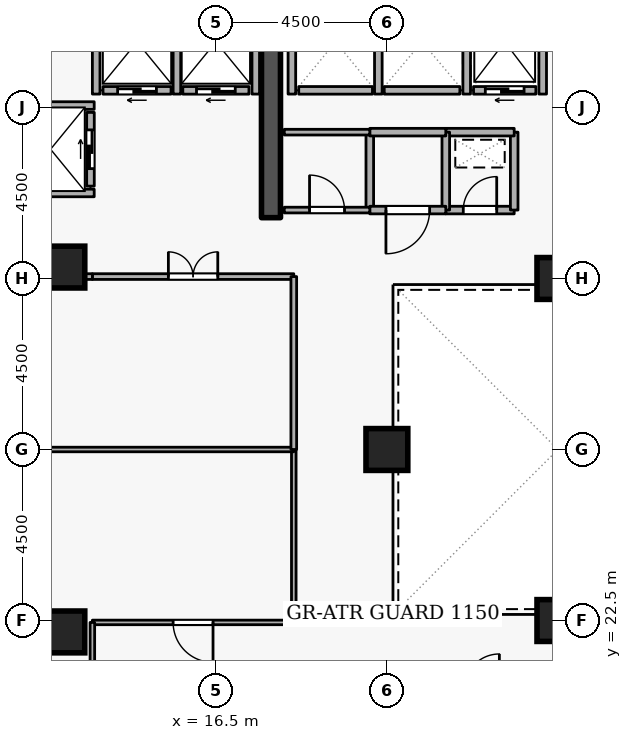
"""IFC4 building model, lengths in metres.
Left out: names, types, materials, properties, quantities, classifications, styles, units other than length and angle.
Written with IfcOpenShell. Run it as: python <this file> out.ifc"""

import sys

from ifc_helpers import new_model, si_unit, direction, frame, frame_2d, origin, origin_2d, place, context, subcontext, project, spatial, rectangle, extrude, element, fill, save


model = new_model("IFC4")
c1 = context("Model", 3, precision=1e-05, world=origin(), true_north=direction((0.0, 1.0)))
c2 = subcontext(c1, "Body", "Model", "MODEL_VIEW")
j1 = project(units=[si_unit("LENGTHUNIT", "METRE"), si_unit("PLANEANGLEUNIT", "RADIAN")], contexts=[c1])
p1 = place(None, origin())
s1 = spatial("IfcSite", under=j1, at=p1, CompositionType="ELEMENT")
p2 = place(p1, origin())
s2 = spatial("IfcBuilding", under=s1, at=p2, CompositionType="ELEMENT")
p3 = place(p2, frame((0.0, 0.0, 156.3)))
s3 = spatial("IfcBuildingStorey", under=s2, at=p3, CompositionType="ELEMENT", Elevation=156.3)
p4 = place(p3, frame((17.95, 33.1, 0.0), z_axis=(0.0, 0.0, 1.0), x_axis=(0.0, 1.0, 0.0)))
e1 = element("IfcWall", 1, at=p4, inside=s3, PredefinedType="SHEAR", context=c2, shape_type="SweptSolid", body=[
    extrude(rectangle(XDim=5.8, YDim=0.5, at=frame_2d((2.9, 0.0))), origin(), (0.0, 0.0, 1.0), 3.6),
])
for number, where, z_axis, x_axis in (
    (2, (12.5, 22.2, 0.0), (0.0, 0.0, 1.0), (1.0, 0.0, 0.0)),
    (3, (12.5, 31.8, 0.0), (0.0, 0.0, 1.0), (1.0, 0.0, 0.0)),
    (4, (25.5, 22.5, 0.0), (0.0, 0.0, 1.0), (1.0, 0.0, 0.0)),
    (5, (25.5, 31.5, 0.0), (0.0, 0.0, 1.0), (1.0, 0.0, 0.0)),
    (6, (21.0, 27.0, 0.0), (0.0, 0.0, 1.0), (1.0, 0.0, 0.0)),
):
    element("IfcColumn", number, at=place(p3, frame(where, z_axis=z_axis, x_axis=x_axis)), inside=s3, PredefinedType="COLUMN", context=c2, shape_type="SweptSolid", body=[
        extrude(rectangle(XDim=1.1, YDim=1.1, at=origin_2d()), origin(), (0.0, 0.0, 1.0), 3.6),
    ])
p5 = place(p3, frame((24.92, 36.45, 0.0), z_axis=(0.0, 0.0, 1.0), x_axis=(-1.0, 0.0, 0.0)))
e7 = element("IfcWall", 7, at=p5, inside=s3, PredefinedType="STANDARD", context=c2, shape_type="SweptSolid", body=[
    extrude(rectangle(XDim=1.64, YDim=0.2, at=frame_2d((0.82, 0.0))), origin(), (0.0, 0.0, 1.0), 3.34),
])
p6 = place(p5, frame((0.31, 0.0, 0.0)))
e8 = element("IfcOpeningElement", 8, at=p6, cuts=e7, PredefinedType="OPENING", context=c2, shape_type="SweptSolid", body=[
    extrude(rectangle(XDim=1.02, YDim=2.06, at=frame_2d((0.51, 1.03))), frame((0.0, 0.11, 0.0), z_axis=(0.0, -1.0, 0.0), x_axis=(1.0, 0.0, 0.0)), (0.0, 0.0, 1.0), 0.22),
])
p7 = place(p3, frame((22.92, 36.45, 0.0), z_axis=(0.0, 0.0, 1.0), x_axis=(-1.0, 0.0, 0.0)))
e9 = element("IfcWall", 9, at=p7, inside=s3, PredefinedType="STANDARD", context=c2, shape_type="SweptSolid", body=[
    extrude(rectangle(XDim=1.99, YDim=0.2, at=frame_2d((0.995, 0.0))), origin(), (0.0, 0.0, 1.0), 3.34),
])
p8 = place(p3, frame((20.62, 36.45, 0.0), z_axis=(0.0, 0.0, 1.0), x_axis=(-1.0, 0.0, 0.0)))
e10 = element("IfcWall", 10, at=p8, inside=s3, PredefinedType="STANDARD", context=c2, shape_type="SweptSolid", body=[
    extrude(rectangle(XDim=1.94, YDim=0.2, at=frame_2d((0.97, 0.0))), origin(), (0.0, 0.0, 1.0), 3.34),
])
p9 = place(p3, frame((17.37, 36.45, 0.0), z_axis=(0.0, 0.0, 1.0), x_axis=(-1.0, 0.0, 0.0)))
e11 = element("IfcWall", 11, at=p9, inside=s3, PredefinedType="STANDARD", context=c2, shape_type="SweptSolid", body=[
    extrude(rectangle(XDim=1.74, YDim=0.2, at=frame_2d((0.87, 0.0))), origin(), (0.0, 0.0, 1.0), 3.34),
])
p10 = place(p9, frame((0.36, 0.0, 0.0)))
e12 = element("IfcOpeningElement", 12, at=p10, cuts=e11, PredefinedType="OPENING", context=c2, shape_type="SweptSolid", body=[
    extrude(rectangle(XDim=1.02, YDim=2.06, at=frame_2d((0.51, 1.03))), frame((0.0, 0.11, 0.0), z_axis=(0.0, -1.0, 0.0), x_axis=(1.0, 0.0, 0.0)), (0.0, 0.0, 1.0), 0.22),
])
p11 = place(p3, frame((15.32, 36.45, 0.0), z_axis=(0.0, 0.0, 1.0), x_axis=(-1.0, 0.0, 0.0)))
e13 = element("IfcWall", 13, at=p11, inside=s3, PredefinedType="STANDARD", context=c2, shape_type="SweptSolid", body=[
    extrude(rectangle(XDim=1.79, YDim=0.2, at=frame_2d((0.895, 0.0))), origin(), (0.0, 0.0, 1.0), 3.34),
])
p12 = place(p11, frame((0.385, 0.0, 0.0)))
e14 = element("IfcOpeningElement", 14, at=p12, cuts=e13, PredefinedType="OPENING", context=c2, shape_type="SweptSolid", body=[
    extrude(rectangle(XDim=1.02, YDim=2.06, at=frame_2d((0.51, 1.03))), frame((0.0, 0.11, 0.0), z_axis=(0.0, -1.0, 0.0), x_axis=(1.0, 0.0, 0.0)), (0.0, 0.0, 1.0), 0.22),
])
p13 = place(p3, frame((13.2, 33.93, 0.0), z_axis=(0.0, 0.0, 1.0), x_axis=(0.0, 1.0, 0.0)))
e15 = element("IfcWall", 15, at=p13, inside=s3, PredefinedType="STANDARD", context=c2, shape_type="SweptSolid", body=[
    extrude(rectangle(XDim=1.94, YDim=0.2, at=frame_2d((0.97, 0.0))), origin(), (0.0, 0.0, 1.0), 3.34),
])
p14 = place(p13, frame((0.46, 0.0, 0.0)))
e16 = element("IfcOpeningElement", 16, at=p14, cuts=e15, PredefinedType="OPENING", context=c2, shape_type="SweptSolid", body=[
    extrude(rectangle(XDim=1.02, YDim=2.06, at=frame_2d((0.51, 1.03))), frame((0.0, 0.11, 0.0), z_axis=(0.0, -1.0, 0.0), x_axis=(1.0, 0.0, 0.0)), (0.0, 0.0, 1.0), 0.22),
])
for number, where, z_axis, x_axis in (
    (17, (25.1, 36.352, 0.0), (0.0, 0.0, 1.0), (0.0, 1.0, 0.0)),
    (18, (23.1, 36.352, 0.0), (0.0, 0.0, 1.0), (0.0, 1.0, 0.0)),
    (19, (20.775, 36.352, 0.0), (0.0, 0.0, 1.0), (0.0, 1.0, 0.0)),
    (20, (18.5, 36.352, 0.0), (0.0, 0.0, 1.0), (0.0, 1.0, 0.0)),
):
    element("IfcWall", number, at=place(p3, frame(where, z_axis=z_axis, x_axis=x_axis)), inside=s3, PredefinedType="STANDARD", context=c2, shape_type="SweptSolid", body=[
        extrude(rectangle(XDim=2.536, YDim=0.2, at=frame_2d((1.268, 0.0))), origin(), (0.0, 0.0, 1.0), 3.34),
    ])
p15 = place(p3, frame((17.55, 36.352, 0.0), z_axis=(0.0, 0.0, 1.0), x_axis=(0.0, 1.0, 0.0)))
e21 = element("IfcWall", 21, at=p15, inside=s3, PredefinedType="STANDARD", context=c2, shape_type="SweptSolid", body=[
    extrude(rectangle(XDim=2.636, YDim=0.2, at=frame_2d((1.318, 0.0))), origin(), (0.0, 0.0, 1.0), 2.545),
])
for number, where, z_axis, x_axis in (
    (22, (15.475, 36.352, 0.0), (0.0, 0.0, 1.0), (0.0, 1.0, 0.0)),
    (23, (13.35, 36.352, 0.0), (0.0, 0.0, 1.0), (0.0, 1.0, 0.0)),
):
    element("IfcWall", number, at=place(p3, frame(where, z_axis=z_axis, x_axis=x_axis)), inside=s3, PredefinedType="STANDARD", context=c2, shape_type="SweptSolid", body=[
        extrude(rectangle(XDim=2.636, YDim=0.2, at=frame_2d((1.318, 0.0))), origin(), (0.0, 0.0, 1.0), 3.34),
    ])
for number, where, z_axis, x_axis in (
    (24, (11.002, 36.05, 0.0), (0.0, 0.0, 1.0), (1.0, 0.0, 0.0)),
    (25, (11.002, 33.75, 0.0), (0.0, 0.0, 1.0), (1.0, 0.0, 0.0)),
):
    element("IfcWall", number, at=place(p3, frame(where, z_axis=z_axis, x_axis=x_axis)), inside=s3, PredefinedType="STANDARD", context=c2, shape_type="SweptSolid", body=[
        extrude(rectangle(XDim=2.296, YDim=0.2, at=frame_2d((1.148, 0.0))), origin(), (0.0, 0.0, 1.0), 3.34),
    ])
p16 = place(p3, frame((22.55, 33.3, 0.0), z_axis=(0.0, 0.0, 1.0), x_axis=(1.0, 0.0, 0.0)))
e26 = element("IfcWall", 26, at=p16, inside=s3, PredefinedType="STANDARD", context=c2, shape_type="SweptSolid", body=[
    extrude(rectangle(XDim=1.8, YDim=0.2, at=frame_2d((0.9, 0.0))), origin(), (0.0, 0.0, 1.0), 3.34),
])
p17 = place(p16, frame((0.46, 0.0, 0.0)))
e27 = element("IfcOpeningElement", 27, at=p17, cuts=e26, PredefinedType="OPENING", context=c2, shape_type="SweptSolid", body=[
    extrude(rectangle(XDim=0.88, YDim=2.04, at=frame_2d((0.44, 1.02))), frame((0.0, 0.11, 0.0), z_axis=(0.0, -1.0, 0.0), x_axis=(1.0, 0.0, 0.0)), (0.0, 0.0, 1.0), 0.22),
])
p18 = place(p3, frame((24.35, 33.3, 0.0), z_axis=(0.0, 0.0, 1.0), x_axis=(0.0, 1.0, 0.0)))
e28 = element("IfcWall", 28, at=p18, inside=s3, PredefinedType="STANDARD", context=c2, shape_type="SweptSolid", body=[
    extrude(rectangle(XDim=2.05, YDim=0.2, at=frame_2d((1.025, 0.0))), origin(), (0.0, 0.0, 1.0), 3.34),
])
p19 = place(p3, frame((24.35, 35.35, 0.0), z_axis=(0.0, 0.0, 1.0), x_axis=(-1.0, 0.0, 0.0)))
e29 = element("IfcWall", 29, at=p19, inside=s3, PredefinedType="STANDARD", context=c2, shape_type="SweptSolid", body=[
    extrude(rectangle(XDim=1.8, YDim=0.2, at=frame_2d((0.9, 0.0))), origin(), (0.0, 0.0, 1.0), 3.34),
])
for number, where, z_axis, x_axis in (
    (30, (22.55, 35.35, 0.0), (0.0, 0.0, 1.0), (0.0, -1.0, 0.0)),
    (31, (20.55, 33.3, 0.0), (0.0, 0.0, 1.0), (0.0, 1.0, 0.0)),
):
    element("IfcWall", number, at=place(p3, frame(where, z_axis=z_axis, x_axis=x_axis)), inside=s3, PredefinedType="STANDARD", context=c2, shape_type="SweptSolid", body=[
        extrude(rectangle(XDim=2.05, YDim=0.2, at=frame_2d((1.025, 0.0))), origin(), (0.0, 0.0, 1.0), 3.34),
    ])
p20 = place(p3, frame((20.55, 35.35, 0.0), z_axis=(0.0, 0.0, 1.0), x_axis=(1.0, 0.0, 0.0)))
e32 = element("IfcWall", 32, at=p20, inside=s3, PredefinedType="STANDARD", context=c2, shape_type="SweptSolid", body=[
    extrude(rectangle(XDim=2.0, YDim=0.2, at=frame_2d((1.0, 0.0))), origin(), (0.0, 0.0, 1.0), 3.34),
])
p21 = place(p3, frame((22.55, 33.3, 0.0), z_axis=(0.0, 0.0, 1.0), x_axis=(-1.0, 0.0, 0.0)))
e33 = element("IfcWall", 33, at=p21, inside=s3, PredefinedType="STANDARD", context=c2, shape_type="SweptSolid", body=[
    extrude(rectangle(XDim=2.0, YDim=0.2, at=frame_2d((1.0, 0.0))), origin(), (0.0, 0.0, 1.0), 3.34),
])
p22 = place(p21, frame((0.425, 0.0, 0.0)))
e34 = element("IfcOpeningElement", 34, at=p22, cuts=e33, PredefinedType="OPENING", context=c2, shape_type="SweptSolid", body=[
    extrude(rectangle(XDim=1.15, YDim=2.1, at=frame_2d((0.575, 1.05))), frame((0.0, 0.11, 0.0), z_axis=(0.0, -1.0, 0.0), x_axis=(1.0, 0.0, 0.0)), (0.0, 0.0, 1.0), 0.22),
])
p23 = place(p3, frame((18.3, 33.3, 0.0), z_axis=(0.0, 0.0, 1.0), x_axis=(1.0, 0.0, 0.0)))
e35 = element("IfcWall", 35, at=p23, inside=s3, PredefinedType="PARTITIONING", context=c2, shape_type="SweptSolid", body=[
    extrude(rectangle(XDim=2.25, YDim=0.15, at=frame_2d((1.125, 0.0))), origin(), (0.0, 0.0, 1.0), 3.34),
])
p24 = place(p23, frame((0.665, 0.0, 0.0)))
e36 = element("IfcOpeningElement", 36, at=p24, cuts=e35, PredefinedType="OPENING", context=c2, shape_type="SweptSolid", body=[
    extrude(rectangle(XDim=0.92, YDim=2.08, at=frame_2d((0.46, 1.04))), frame((0.0, 0.085, 0.0), z_axis=(0.0, -1.0, 0.0), x_axis=(1.0, 0.0, 0.0)), (0.0, 0.0, 1.0), 0.17),
])
p25 = place(p3, frame((20.55, 35.35, 0.0), z_axis=(0.0, 0.0, 1.0), x_axis=(-1.0, 0.0, 0.0)))
e37 = element("IfcWall", 37, at=p25, inside=s3, PredefinedType="PARTITIONING", context=c2, shape_type="SweptSolid", body=[
    extrude(rectangle(XDim=2.25, YDim=0.15, at=frame_2d((1.125, 0.0))), origin(), (0.0, 0.0, 1.0), 3.34),
])
p26 = place(p3, frame((18.55, 27.0, 0.0), z_axis=(0.0, 0.0, 1.0), x_axis=(0.0, -1.0, 0.0)))
e38 = element("IfcWall", 38, at=p26, inside=s3, PredefinedType="PARTITIONING", context=c2, shape_type="SweptSolid", body=[
    extrude(rectangle(XDim=4.55, YDim=0.12, at=frame_2d((2.275, 0.0))), origin(), (0.0, 0.0, 1.0), 3.34),
])
p27 = place(p3, frame((18.55, 22.45, 0.0), z_axis=(0.0, 0.0, 1.0), x_axis=(-1.0, 0.0, 0.0)))
e39 = element("IfcWall", 39, at=p27, inside=s3, PredefinedType="PARTITIONING", context=c2, shape_type="SweptSolid", body=[
    extrude(rectangle(XDim=5.3, YDim=0.12, at=frame_2d((2.65, 0.0))), origin(), (0.0, 0.0, 1.0), 3.34),
])
p28 = place(p27, frame((2.125, 0.0, 0.0)))
e40 = element("IfcOpeningElement", 40, at=p28, cuts=e39, PredefinedType="OPENING", context=c2, shape_type="SweptSolid", body=[
    extrude(rectangle(XDim=1.05, YDim=2.1, at=frame_2d((0.525, 1.05))), frame((0.0, 0.07, 0.0), z_axis=(0.0, -1.0, 0.0), x_axis=(1.0, 0.0, 0.0)), (0.0, 0.0, 1.0), 0.14),
])
p29 = place(p3, frame((13.25, 22.45, 0.0), z_axis=(0.0, 0.0, 1.0), x_axis=(0.0, -1.0, 0.0)))
e41 = element("IfcWall", 41, at=p29, inside=s3, PredefinedType="PARTITIONING", context=c2, shape_type="SweptSolid", body=[
    extrude(rectangle(XDim=1.75, YDim=0.12, at=frame_2d((0.875, 0.0))), origin(), (0.0, 0.0, 1.0), 3.34),
])
p30 = place(p3, frame((7.78, 27.0, 0.0), z_axis=(0.0, 0.0, 1.0), x_axis=(1.0, 0.0, 0.0)))
e42 = element("IfcWall", 42, at=p30, inside=s3, PredefinedType="PARTITIONING", context=c2, shape_type="SweptSolid", body=[
    extrude(rectangle(XDim=10.77, YDim=0.12, at=frame_2d((5.385, 0.0))), origin(), (0.0, 0.0, 1.0), 2.932),
])
p31 = place(p3, frame((13.25, 31.55, 0.0), z_axis=(0.0, 0.0, 1.0), x_axis=(1.0, 0.0, 0.0)))
e43 = element("IfcWall", 43, at=p31, inside=s3, PredefinedType="PARTITIONING", context=c2, shape_type="SweptSolid", body=[
    extrude(rectangle(XDim=5.3, YDim=0.15, at=frame_2d((2.65, 0.0))), origin(), (0.0, 0.0, 1.0), 3.34),
])
p32 = place(p31, frame((2.0, 0.0, 0.0)))
e44 = element("IfcOpeningElement", 44, at=p32, cuts=e43, PredefinedType="OPENING", context=c2, shape_type="SweptSolid", body=[
    extrude(rectangle(XDim=1.3, YDim=2.12, at=frame_2d((0.65, 1.06))), frame((0.0, 0.085, 0.0), z_axis=(0.0, -1.0, 0.0), x_axis=(1.0, 0.0, 0.0)), (0.0, 0.0, 1.0), 0.17),
])
p33 = place(p3, frame((18.55, 31.55, 0.0), z_axis=(0.0, 0.0, 1.0), x_axis=(0.0, -1.0, 0.0)))
e45 = element("IfcWall", 45, at=p33, inside=s3, PredefinedType="PARTITIONING", context=c2, shape_type="SweptSolid", body=[
    extrude(rectangle(XDim=4.55, YDim=0.15, at=frame_2d((2.275, 0.0))), origin(), (0.0, 0.0, 1.0), 3.34),
])
p34 = place(p3, frame((10.9, 31.55, 0.0), z_axis=(0.0, 0.0, 1.0), x_axis=(1.0, 0.0, 0.0)))
e46 = element("IfcWall", 46, at=p34, inside=s3, PredefinedType="PARTITIONING", context=c2, shape_type="SweptSolid", body=[
    extrude(rectangle(XDim=2.35, YDim=0.15, at=frame_2d((1.175, 0.0))), origin(), (0.0, 0.0, 1.0), 3.34),
])
p35 = place(p6, origin())
e47 = element("IfcDoor", 47, at=p35, inside=s3, OperationType="SLIDING_TO_LEFT", PredefinedType="DOOR", context=c2, shape_type="SweptSolid", body=[
    extrude(rectangle(XDim=1.02, YDim=2.06, at=frame_2d((0.51, 1.03))), frame((0.0, 0.025, 0.0), z_axis=(0.0, -1.0, 0.0), x_axis=(1.0, 0.0, 0.0)), (0.0, 0.0, 1.0), 0.05),
])
fill(e8, e47)
p36 = place(p10, origin())
e48 = element("IfcDoor", 48, at=p36, inside=s3, OperationType="SLIDING_TO_LEFT", PredefinedType="DOOR", context=c2, shape_type="SweptSolid", body=[
    extrude(rectangle(XDim=1.02, YDim=2.06, at=frame_2d((0.51, 1.03))), frame((0.0, 0.025, 0.0), z_axis=(0.0, -1.0, 0.0), x_axis=(1.0, 0.0, 0.0)), (0.0, 0.0, 1.0), 0.05),
])
fill(e12, e48)
p37 = place(p12, origin())
e49 = element("IfcDoor", 49, at=p37, inside=s3, OperationType="SLIDING_TO_LEFT", PredefinedType="DOOR", context=c2, shape_type="SweptSolid", body=[
    extrude(rectangle(XDim=1.02, YDim=2.06, at=frame_2d((0.51, 1.03))), frame((0.0, 0.025, 0.0), z_axis=(0.0, -1.0, 0.0), x_axis=(1.0, 0.0, 0.0)), (0.0, 0.0, 1.0), 0.05),
])
fill(e14, e49)
p38 = place(p14, origin())
e50 = element("IfcDoor", 50, at=p38, inside=s3, OperationType="SLIDING_TO_LEFT", PredefinedType="DOOR", context=c2, shape_type="SweptSolid", body=[
    extrude(rectangle(XDim=1.02, YDim=2.06, at=frame_2d((0.51, 1.03))), frame((0.0, 0.025, 0.0), z_axis=(0.0, -1.0, 0.0), x_axis=(1.0, 0.0, 0.0)), (0.0, 0.0, 1.0), 0.05),
])
fill(e16, e50)
p39 = place(p17, origin())
e51 = element("IfcDoor", 51, at=p39, inside=s3, OperationType="SINGLE_SWING_RIGHT", PredefinedType="DOOR", context=c2, shape_type="SweptSolid", body=[
    extrude(rectangle(XDim=0.88, YDim=2.04, at=frame_2d((0.44, 1.02))), frame((0.0, 0.025, 0.0), z_axis=(0.0, -1.0, 0.0), x_axis=(1.0, 0.0, 0.0)), (0.0, 0.0, 1.0), 0.05),
])
fill(e27, e51)
p40 = place(p24, origin())
e52 = element("IfcDoor", 52, at=p40, inside=s3, OperationType="SINGLE_SWING_LEFT", PredefinedType="DOOR", context=c2, shape_type="SweptSolid", body=[
    extrude(rectangle(XDim=0.92, YDim=2.08, at=frame_2d((0.46, 1.04))), frame((0.0, 0.025, 0.0), z_axis=(0.0, -1.0, 0.0), x_axis=(1.0, 0.0, 0.0)), (0.0, 0.0, 1.0), 0.05),
])
fill(e36, e52)
p41 = place(p22, origin())
e53 = element("IfcDoor", 53, at=p41, inside=s3, OperationType="SINGLE_SWING_RIGHT", PredefinedType="DOOR", context=c2, shape_type="SweptSolid", body=[
    extrude(rectangle(XDim=1.15, YDim=2.1, at=frame_2d((0.575, 1.05))), frame((0.0, 0.025, 0.0), z_axis=(0.0, -1.0, 0.0), x_axis=(1.0, 0.0, 0.0)), (0.0, 0.0, 1.0), 0.05),
])
fill(e34, e53)
p42 = place(p28, origin())
e54 = element("IfcDoor", 54, at=p42, inside=s3, OperationType="SINGLE_SWING_LEFT", PredefinedType="DOOR", context=c2, shape_type="SweptSolid", body=[
    extrude(rectangle(XDim=1.05, YDim=2.1, at=frame_2d((0.525, 1.05))), frame((0.0, 0.025, 0.0), z_axis=(0.0, -1.0, 0.0), x_axis=(1.0, 0.0, 0.0)), (0.0, 0.0, 1.0), 0.05),
])
fill(e40, e54)
p43 = place(p32, origin())
e55 = element("IfcDoor", 55, at=p43, inside=s3, OperationType="DOUBLE_DOOR_SINGLE_SWING", PredefinedType="DOOR", context=c2, shape_type="SweptSolid", body=[
    extrude(rectangle(XDim=1.3, YDim=2.12, at=frame_2d((0.65, 1.06))), frame((0.0, 0.025, 0.0), z_axis=(0.0, -1.0, 0.0), x_axis=(1.0, 0.0, 0.0)), (0.0, 0.0, 1.0), 0.05),
])
fill(e44, e55)
save(model, sys.argv[1])
